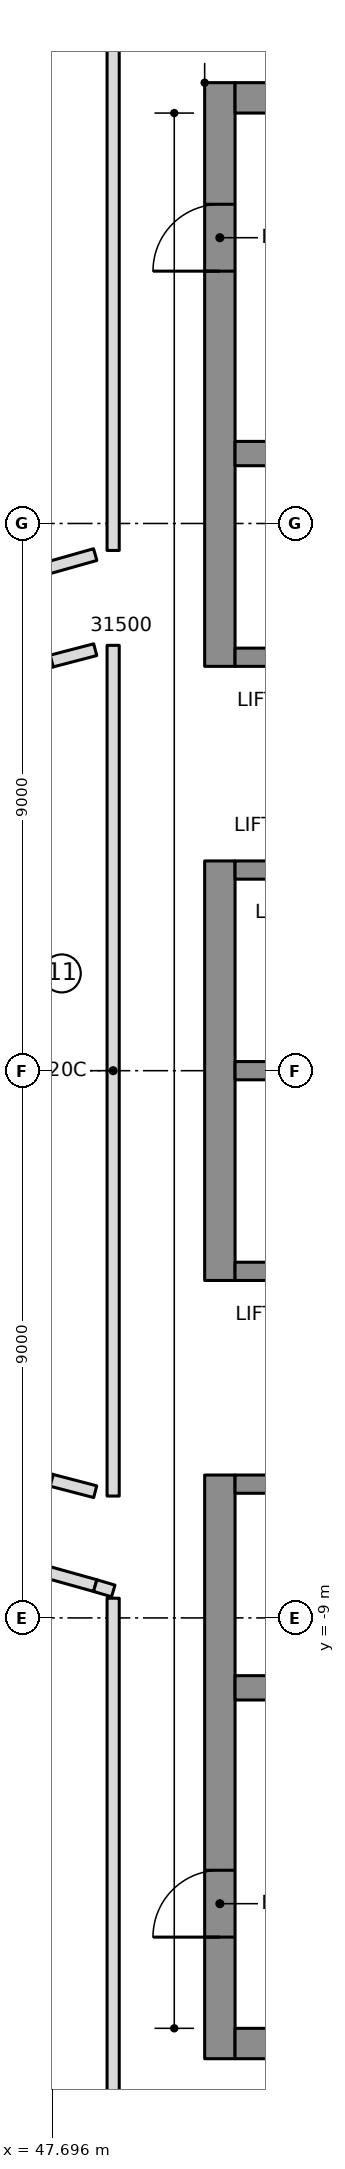
"""IFC4 building model, lengths in metres.
Left out: names, types, materials, properties, quantities, classifications, styles, units other than length and angle.
Written with IfcOpenShell. Run it as: python <this file> out.ifc"""

import sys

from ifc_helpers import new_model, si_unit, direction, frame, frame_2d, origin, place, context, subcontext, project, spatial, rectangle, extrude, element, fill, save


model = new_model("IFC4")
c1 = context("Model", 3, precision=1e-05, world=origin(), true_north=direction((0.0, 1.0)))
c2 = subcontext(c1, "Body", "Model", "MODEL_VIEW")
j1 = project(units=[si_unit("LENGTHUNIT", "METRE"), si_unit("PLANEANGLEUNIT", "RADIAN")], contexts=[c1])
p1 = place(None, origin())
s1 = spatial("IfcSite", under=j1, at=p1, CompositionType="ELEMENT")
p2 = place(p1, origin())
s2 = spatial("IfcBuilding", under=s1, at=p2, CompositionType="ELEMENT")
p3 = place(p2, frame((0.0, 0.0, 299.85)))
s3 = spatial("IfcBuildingStorey", under=s2, at=p3, CompositionType="ELEMENT", Elevation=299.85)
p4 = place(p3, frame((50.45, 6.65, 0.0), z_axis=(0.0, 0.0, 1.0), x_axis=(0.0, 1.0, 0.0)))
e1 = element("IfcWall", 1, at=p4, inside=s3, PredefinedType="SHEAR", context=c2, shape_type="SweptSolid", body=[
    extrude(rectangle(XDim=9.6, YDim=0.5, at=frame_2d((4.8, 0.0))), origin(), (0.0, 0.0, 1.0), 3.55),
])
p5 = place(p4, frame((6.5, 0.0, 0.0)))
e2 = element("IfcOpeningElement", 2, at=p5, cuts=e1, PredefinedType="OPENING", context=c2, shape_type="SweptSolid", body=[
    extrude(rectangle(XDim=1.1, YDim=2.1, at=frame_2d((0.55, 1.05))), frame((0.0, 0.26, 0.0), z_axis=(0.0, -1.0, 0.0), x_axis=(1.0, 0.0, 0.0)), (0.0, 0.0, 1.0), 0.52),
])
p6 = place(p3, frame((50.45, -3.45, 0.0), z_axis=(0.0, 0.0, 1.0), x_axis=(0.0, 1.0, 0.0)))
e3 = element("IfcWall", 3, at=p6, inside=s3, PredefinedType="SHEAR", context=c2, shape_type="SweptSolid", body=[
    extrude(rectangle(XDim=6.9, YDim=0.5, at=frame_2d((3.45, 0.0))), origin(), (0.0, 0.0, 1.0), 3.55),
])
p7 = place(p3, frame((50.45, -16.25, 0.0), z_axis=(0.0, 0.0, 1.0), x_axis=(0.0, 1.0, 0.0)))
e4 = element("IfcWall", 4, at=p7, inside=s3, PredefinedType="SHEAR", context=c2, shape_type="SweptSolid", body=[
    extrude(rectangle(XDim=9.6, YDim=0.5, at=frame_2d((4.8, 0.0))), origin(), (0.0, 0.0, 1.0), 3.55),
])
p8 = place(p7, frame((2.0, 0.0, 0.0)))
e5 = element("IfcOpeningElement", 5, at=p8, cuts=e4, PredefinedType="OPENING", context=c2, shape_type="SweptSolid", body=[
    extrude(rectangle(XDim=1.1, YDim=2.1, at=frame_2d((0.55, 1.05))), frame((0.0, 0.26, 0.0), z_axis=(0.0, -1.0, 0.0), x_axis=(1.0, 0.0, 0.0)), (0.0, 0.0, 1.0), 0.52),
])
for number, where, z_axis, x_axis in (
    (6, (50.7, 16.0, 0.0), (0.0, 0.0, 1.0), (1.0, 0.0, 0.0)),
    (7, (50.7, -16.0, 0.0), (0.0, 0.0, 1.0), (1.0, 0.0, 0.0)),
):
    element("IfcWall", number, at=place(p3, frame(where, z_axis=z_axis, x_axis=x_axis)), inside=s3, PredefinedType="SHEAR", context=c2, shape_type="SweptSolid", body=[
        extrude(rectangle(XDim=13.52, YDim=0.5, at=frame_2d((6.76, 0.0))), origin(), (0.0, 0.0, 1.0), 3.55),
    ])
p9 = place(p3, frame((50.7, 10.15, 0.0), z_axis=(0.0, 0.0, 1.0), x_axis=(1.0, 0.0, 0.0)))
e8 = element("IfcWall", 8, at=p9, inside=s3, PredefinedType="SHEAR", context=c2, shape_type="SweptSolid", body=[
    extrude(rectangle(XDim=13.02, YDim=0.4, at=frame_2d((6.51, 0.0))), origin(), (0.0, 0.0, 1.0), 3.55),
])
p10 = place(p9, frame((0.7, 0.0, 0.0)))
e9 = element("IfcOpeningElement", 9, at=p10, cuts=e8, PredefinedType="OPENING", context=c2, shape_type="SweptSolid", body=[
    extrude(rectangle(XDim=1.1, YDim=2.1, at=frame_2d((0.55, 1.05))), frame((0.0, 0.21, 0.0), z_axis=(0.0, -1.0, 0.0), x_axis=(1.0, 0.0, 0.0)), (0.0, 0.0, 1.0), 0.42),
])
p11 = place(p9, frame((3.5, 0.0, 0.0)))
e10 = element("IfcOpeningElement", 10, at=p11, cuts=e8, PredefinedType="OPENING", context=c2, shape_type="SweptSolid", body=[
    extrude(rectangle(XDim=1.1, YDim=2.1, at=frame_2d((0.55, 1.05))), frame((0.0, 0.21, 0.0), z_axis=(0.0, -1.0, 0.0), x_axis=(1.0, 0.0, 0.0)), (0.0, 0.0, 1.0), 0.42),
])
p12 = place(p3, frame((50.7, -10.15, 0.0), z_axis=(0.0, 0.0, 1.0), x_axis=(1.0, 0.0, 0.0)))
e11 = element("IfcWall", 11, at=p12, inside=s3, PredefinedType="SHEAR", context=c2, shape_type="SweptSolid", body=[
    extrude(rectangle(XDim=13.02, YDim=0.4, at=frame_2d((6.51, 0.0))), origin(), (0.0, 0.0, 1.0), 3.55),
])
p13 = place(p3, frame((50.7, 0.0, 0.0), z_axis=(0.0, 0.0, 1.0), x_axis=(1.0, 0.0, 0.0)))
e12 = element("IfcWall", 12, at=p13, inside=s3, PredefinedType="SHEAR", context=c2, shape_type="SweptSolid", body=[
    extrude(rectangle(XDim=10.9, YDim=0.3, at=frame_2d((5.45, 0.0))), origin(), (0.0, 0.0, 1.0), 3.55),
])
p14 = place(p3, frame((50.7, 3.3, 0.0), z_axis=(0.0, 0.0, 1.0), x_axis=(1.0, 0.0, 0.0)))
e13 = element("IfcWall", 13, at=p14, inside=s3, PredefinedType="SHEAR", context=c2, shape_type="SweptSolid", body=[
    extrude(rectangle(XDim=10.9, YDim=0.3, at=frame_2d((5.45, 0.0))), origin(), (0.0, 0.0, 1.0), 3.55),
])
p15 = place(p14, frame((0.7, 0.0, 0.0)))
e14 = element("IfcOpeningElement", 14, at=p15, cuts=e13, PredefinedType="OPENING", context=c2, shape_type="SweptSolid", body=[
    extrude(rectangle(XDim=1.1, YDim=2.1, at=frame_2d((0.55, 1.05))), frame((0.0, 0.16, 0.0), z_axis=(0.0, -1.0, 0.0), x_axis=(1.0, 0.0, 0.0)), (0.0, 0.0, 1.0), 0.32),
])
p16 = place(p14, frame((3.5, 0.0, 0.0)))
e15 = element("IfcOpeningElement", 15, at=p16, cuts=e13, PredefinedType="OPENING", context=c2, shape_type="SweptSolid", body=[
    extrude(rectangle(XDim=1.1, YDim=2.1, at=frame_2d((0.55, 1.05))), frame((0.0, 0.16, 0.0), z_axis=(0.0, -1.0, 0.0), x_axis=(1.0, 0.0, 0.0)), (0.0, 0.0, 1.0), 0.32),
])
p17 = place(p14, frame((6.4, 0.0, 0.0)))
e16 = element("IfcOpeningElement", 16, at=p17, cuts=e13, PredefinedType="OPENING", context=c2, shape_type="SweptSolid", body=[
    extrude(rectangle(XDim=0.9, YDim=2.1, at=frame_2d((0.45, 1.05))), frame((0.0, 0.16, 0.0), z_axis=(0.0, -1.0, 0.0), x_axis=(1.0, 0.0, 0.0)), (0.0, 0.0, 1.0), 0.32),
])
p18 = place(p14, frame((9.2, 0.0, 0.0)))
e17 = element("IfcOpeningElement", 17, at=p18, cuts=e13, PredefinedType="OPENING", context=c2, shape_type="SweptSolid", body=[
    extrude(rectangle(XDim=0.9, YDim=2.1, at=frame_2d((0.45, 1.05))), frame((0.0, 0.16, 0.0), z_axis=(0.0, -1.0, 0.0), x_axis=(1.0, 0.0, 0.0)), (0.0, 0.0, 1.0), 0.32),
])
p19 = place(p3, frame((50.7, 6.8, 0.0), z_axis=(0.0, 0.0, 1.0), x_axis=(1.0, 0.0, 0.0)))
e18 = element("IfcWall", 18, at=p19, inside=s3, PredefinedType="SHEAR", context=c2, shape_type="SweptSolid", body=[
    extrude(rectangle(XDim=10.9, YDim=0.3, at=frame_2d((5.45, 0.0))), origin(), (0.0, 0.0, 1.0), 3.55),
])
p20 = place(p19, frame((6.4, 0.0, 0.0)))
e19 = element("IfcOpeningElement", 19, at=p20, cuts=e18, PredefinedType="OPENING", context=c2, shape_type="SweptSolid", body=[
    extrude(rectangle(XDim=0.9, YDim=2.1, at=frame_2d((0.45, 1.05))), frame((0.0, 0.16, 0.0), z_axis=(0.0, -1.0, 0.0), x_axis=(1.0, 0.0, 0.0)), (0.0, 0.0, 1.0), 0.32),
])
p21 = place(p19, frame((9.2, 0.0, 0.0)))
e20 = element("IfcOpeningElement", 20, at=p21, cuts=e18, PredefinedType="OPENING", context=c2, shape_type="SweptSolid", body=[
    extrude(rectangle(XDim=0.9, YDim=2.1, at=frame_2d((0.45, 1.05))), frame((0.0, 0.16, 0.0), z_axis=(0.0, -1.0, 0.0), x_axis=(1.0, 0.0, 0.0)), (0.0, 0.0, 1.0), 0.32),
])
p22 = place(p3, frame((50.7, -3.3, 0.0), z_axis=(0.0, 0.0, 1.0), x_axis=(1.0, 0.0, 0.0)))
e21 = element("IfcWall", 21, at=p22, inside=s3, PredefinedType="SHEAR", context=c2, shape_type="SweptSolid", body=[
    extrude(rectangle(XDim=10.9, YDim=0.3, at=frame_2d((5.45, 0.0))), origin(), (0.0, 0.0, 1.0), 3.55),
])
p23 = place(p22, frame((9.1, 0.0, 0.0)))
e22 = element("IfcOpeningElement", 22, at=p23, cuts=e21, PredefinedType="OPENING", context=c2, shape_type="SweptSolid", body=[
    extrude(rectangle(XDim=1.1, YDim=2.1, at=frame_2d((0.55, 1.05))), frame((0.0, 0.16, 0.0), z_axis=(0.0, -1.0, 0.0), x_axis=(1.0, 0.0, 0.0)), (0.0, 0.0, 1.0), 0.32),
])
p24 = place(p3, frame((50.7, -6.8, 0.0), z_axis=(0.0, 0.0, 1.0), x_axis=(1.0, 0.0, 0.0)))
e23 = element("IfcWall", 23, at=p24, inside=s3, PredefinedType="SHEAR", context=c2, shape_type="SweptSolid", body=[
    extrude(rectangle(XDim=10.9, YDim=0.3, at=frame_2d((5.45, 0.0))), origin(), (0.0, 0.0, 1.0), 3.55),
])
p25 = place(p24, frame((6.3, 0.0, 0.0)))
e24 = element("IfcOpeningElement", 24, at=p25, cuts=e23, PredefinedType="OPENING", context=c2, shape_type="SweptSolid", body=[
    extrude(rectangle(XDim=1.1, YDim=2.1, at=frame_2d((0.55, 1.05))), frame((0.0, 0.16, 0.0), z_axis=(0.0, -1.0, 0.0), x_axis=(1.0, 0.0, 0.0)), (0.0, 0.0, 1.0), 0.32),
])
p26 = place(p24, frame((9.1, 0.0, 0.0)))
e25 = element("IfcOpeningElement", 25, at=p26, cuts=e23, PredefinedType="OPENING", context=c2, shape_type="SweptSolid", body=[
    extrude(rectangle(XDim=1.1, YDim=2.1, at=frame_2d((0.55, 1.05))), frame((0.0, 0.16, 0.0), z_axis=(0.0, -1.0, 0.0), x_axis=(1.0, 0.0, 0.0)), (0.0, 0.0, 1.0), 0.32),
])
p27 = place(p24, frame((0.8, 0.0, 0.0)))
e26 = element("IfcOpeningElement", 26, at=p27, cuts=e23, PredefinedType="OPENING", context=c2, shape_type="SweptSolid", body=[
    extrude(rectangle(XDim=0.9, YDim=2.1, at=frame_2d((0.45, 1.05))), frame((0.0, 0.16, 0.0), z_axis=(0.0, -1.0, 0.0), x_axis=(1.0, 0.0, 0.0)), (0.0, 0.0, 1.0), 0.32),
])
p28 = place(p24, frame((3.6, 0.0, 0.0)))
e27 = element("IfcOpeningElement", 27, at=p28, cuts=e23, PredefinedType="OPENING", context=c2, shape_type="SweptSolid", body=[
    extrude(rectangle(XDim=0.9, YDim=2.1, at=frame_2d((0.45, 1.05))), frame((0.0, 0.16, 0.0), z_axis=(0.0, -1.0, 0.0), x_axis=(1.0, 0.0, 0.0)), (0.0, 0.0, 1.0), 0.32),
])
p29 = place(p3, frame((43.918, 5.675, 0.0), z_axis=(0.0, 0.0, 1.0), x_axis=(0.962411212211, 0.271596499628, 0.0)))
e28 = element("IfcWall", 28, at=p29, inside=s3, PredefinedType="PARTITIONING", context=c2, shape_type="SweptSolid", body=[
    extrude(rectangle(XDim=3.913, YDim=0.2, at=frame_2d((1.957, 0.0))), origin(), (0.0, 0.0, 1.0), 3.15),
])
p30 = place(p29, frame((1.457, 0.0, 0.0)))
e29 = element("IfcOpeningElement", 29, at=p30, cuts=e28, PredefinedType="OPENING", context=c2, shape_type="SweptSolid", body=[
    extrude(rectangle(XDim=1.5, YDim=2.1, at=frame_2d((0.75, 1.05))), frame((0.0, 0.11, 0.0), z_axis=(0.0, -1.0, 0.0), x_axis=(1.0, 0.0, 0.0)), (0.0, 0.0, 1.0), 0.22),
])
p31 = place(p3, frame((47.684, -6.738, 0.0), z_axis=(0.0, 0.0, 1.0), x_axis=(-0.962411212211, 0.271596499628, 0.0)))
e30 = element("IfcWall", 30, at=p31, inside=s3, PredefinedType="PARTITIONING", context=c2, shape_type="SweptSolid", body=[
    extrude(rectangle(XDim=3.913, YDim=0.2, at=frame_2d((1.957, 0.0))), origin(), (0.0, 0.0, 1.0), 3.15),
])
p32 = place(p3, frame((48.4, 8.488, 0.0), z_axis=(0.0, 0.0, 1.0), x_axis=(-0.962293631271, -0.272012807081, 0.0)))
e31 = element("IfcWall", 31, at=p32, inside=s3, PredefinedType="PARTITIONING", context=c2, shape_type="SweptSolid", body=[
    extrude(rectangle(XDim=6.694, YDim=0.2, at=frame_2d((3.347, 0.0))), origin(), (0.0, 0.0, 1.0), 3.15),
])
p33 = place(p32, frame((1.5, 0.0, 0.0)))
e32 = element("IfcOpeningElement", 32, at=p33, cuts=e31, PredefinedType="OPENING", context=c2, shape_type="SweptSolid", body=[
    extrude(rectangle(XDim=1.5, YDim=2.1, at=frame_2d((0.75, 1.05))), frame((0.0, 0.11, 0.0), z_axis=(0.0, -1.0, 0.0), x_axis=(1.0, 0.0, 0.0)), (0.0, 0.0, 1.0), 0.22),
])
p34 = place(p3, frame((41.958, -6.667, 0.0), z_axis=(0.0, 0.0, 1.0), x_axis=(0.963063656884, -0.269273824925, 0.0)))
e33 = element("IfcWall", 33, at=p34, inside=s3, PredefinedType="PARTITIONING", context=c2, shape_type="SweptSolid", body=[
    extrude(rectangle(XDim=6.688, YDim=0.2, at=frame_2d((3.344, 0.0))), origin(), (0.0, 0.0, 1.0), 3.15),
])
p35 = place(p34, frame((3.95, 0.0, 0.0)))
e34 = element("IfcOpeningElement", 34, at=p35, cuts=e33, PredefinedType="OPENING", context=c2, shape_type="SweptSolid", body=[
    extrude(rectangle(XDim=1.5, YDim=2.1, at=frame_2d((0.75, 1.05))), frame((0.0, 0.11, 0.0), z_axis=(0.0, -1.0, 0.0), x_axis=(1.0, 0.0, 0.0)), (0.0, 0.0, 1.0), 0.22),
])
for number, where, z_axis, x_axis in (
    (35, (47.684, 6.738, 0.0), (0.0, 0.0, 1.0), (0.968, 0.253, 0.0)),
    (36, (48.4, -6.924, 0.0), (0.0, 0.0, 1.0), (-0.968, 0.253, 0.0)),
):
    element("IfcWall", number, at=place(p3, frame(where, z_axis=z_axis, x_axis=x_axis)), inside=s3, PredefinedType="PARTITIONING", context=c2, shape_type="SweptSolid", body=[
        extrude(rectangle(XDim=0.74, YDim=0.2, at=frame_2d((0.37, 0.0))), origin(), (0.0, 0.0, 1.0), 3.15),
    ])
p36 = place(p3, frame((48.695, 6.996, 0.0), z_axis=(0.0, 0.0, 1.0), x_axis=(0.0, -1.0, 0.0)))
e37 = element("IfcWall", 37, at=p36, inside=s3, PredefinedType="PARTITIONING", context=c2, shape_type="SweptSolid", body=[
    extrude(rectangle(XDim=13.992, YDim=0.2, at=frame_2d((6.996, 0.0))), origin(), (0.0, 0.0, 1.0), 3.15),
])
p37 = place(p3, frame((48.695, 18.553, 0.0), z_axis=(0.0, 0.0, 1.0), x_axis=(0.0, -1.0, 0.0)))
e38 = element("IfcWall", 38, at=p37, inside=s3, PredefinedType="PARTITIONING", context=c2, shape_type="SweptSolid", body=[
    extrude(rectangle(XDim=9.997, YDim=0.2, at=frame_2d((4.998, 0.0))), origin(), (0.0, 0.0, 1.0), 3.15),
])
p38 = place(p3, frame((48.4, -8.469, 0.0), z_axis=(0.0, 0.0, 1.0), x_axis=(0.958495645602, -0.285107168207, 0.0)))
e39 = element("IfcWall", 39, at=p38, inside=s3, PredefinedType="PARTITIONING", context=c2, shape_type="SweptSolid", body=[
    extrude(rectangle(XDim=0.31, YDim=0.2, at=frame_2d((0.155, 0.0))), origin(), (0.0, 0.0, 1.0), 3.15),
])
p39 = place(p3, frame((48.695, -8.676, 0.0), z_axis=(0.0, 0.0, 1.0), x_axis=(0.0, -1.0, 0.0)))
e40 = element("IfcWall", 40, at=p39, inside=s3, PredefinedType="PARTITIONING", context=c2, shape_type="SweptSolid", body=[
    extrude(rectangle(XDim=9.877, YDim=0.2, at=frame_2d((4.938, 0.0))), origin(), (0.0, 0.0, 1.0), 3.15),
])
p40 = place(p5, origin())
e41 = element("IfcDoor", 41, at=p40, inside=s3, OperationType="SINGLE_SWING_RIGHT", PredefinedType="DOOR", context=c2, shape_type="SweptSolid", body=[
    extrude(rectangle(XDim=1.1, YDim=2.1, at=frame_2d((0.55, 1.05))), frame((0.0, 0.025, 0.0), z_axis=(0.0, -1.0, 0.0), x_axis=(1.0, 0.0, 0.0)), (0.0, 0.0, 1.0), 0.05),
])
fill(e2, e41)
p41 = place(p8, origin())
e42 = element("IfcDoor", 42, at=p41, inside=s3, OperationType="SINGLE_SWING_RIGHT", PredefinedType="DOOR", context=c2, shape_type="SweptSolid", body=[
    extrude(rectangle(XDim=1.1, YDim=2.1, at=frame_2d((0.55, 1.05))), frame((0.0, 0.025, 0.0), z_axis=(0.0, -1.0, 0.0), x_axis=(1.0, 0.0, 0.0)), (0.0, 0.0, 1.0), 0.05),
])
fill(e5, e42)
save(model, sys.argv[1])
